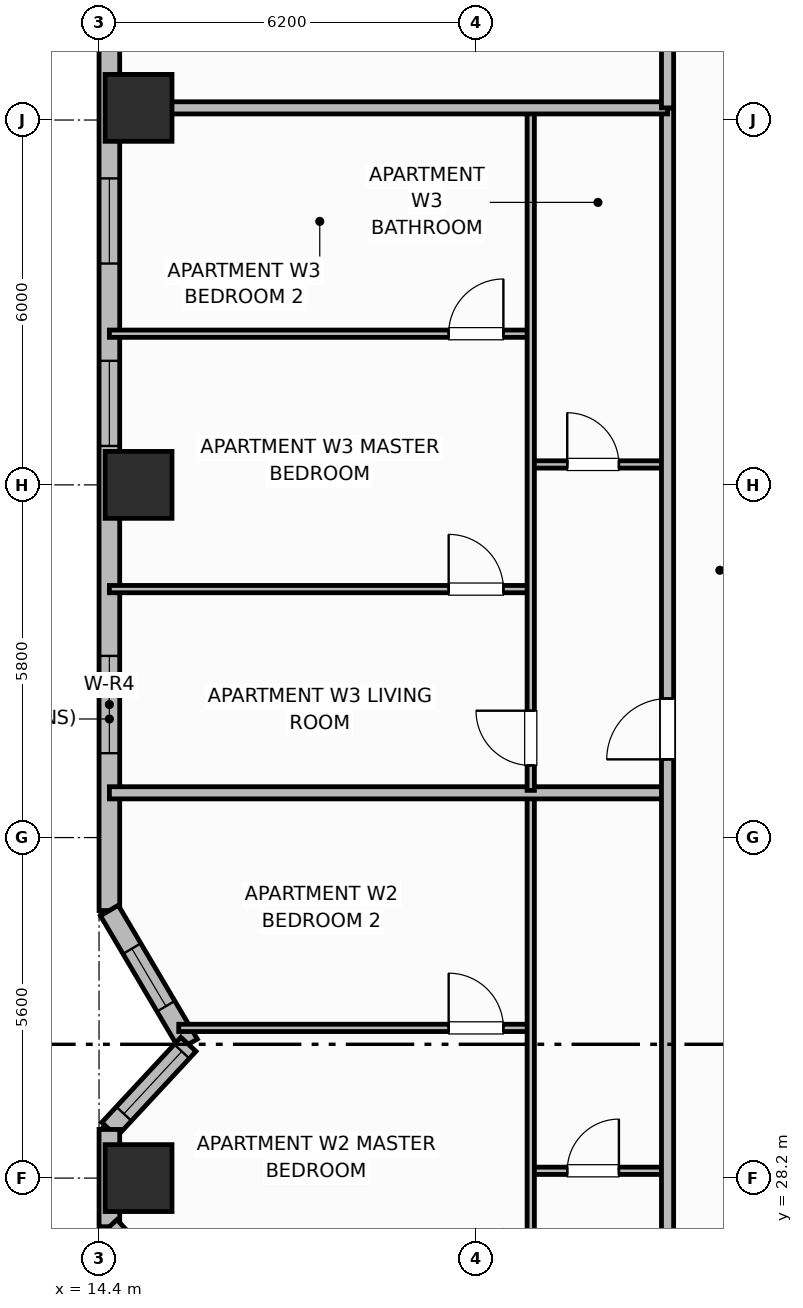
"""IFC4 building model, lengths in metres.
Left out: names, types, materials, properties, quantities, classifications, styles, units other than length and angle.
Written with IfcOpenShell. Run it as: python <this file> out.ifc"""

import sys

from ifc_helpers import new_model, si_unit, direction, frame, frame_2d, origin, origin_2d, place, context, subcontext, project, spatial, rectangle, extrude, element, fill, save


model = new_model("IFC4")
c1 = context("Model", 3, precision=1e-05, world=origin(), true_north=direction((0.0, 1.0)))
c2 = subcontext(c1, "Body", "Model", "MODEL_VIEW")
j1 = project(units=[si_unit("LENGTHUNIT", "METRE"), si_unit("PLANEANGLEUNIT", "RADIAN")], contexts=[c1])
p1 = place(None, origin())
s1 = spatial("IfcSite", under=j1, at=p1, CompositionType="ELEMENT")
p2 = place(p1, origin())
s2 = spatial("IfcBuilding", under=s1, at=p2, CompositionType="ELEMENT")
p3 = place(p2, frame((0.0, 0.0, 110.5)))
s3 = spatial("IfcBuildingStorey", under=s2, at=p3, CompositionType="ELEMENT", Elevation=110.5)
for number, where, z_axis, x_axis in (
    (1, (15.05, 28.2, 0.0), (0.0, 0.0, 1.0), (1.0, 0.0, 0.0)),
    (2, (15.05, 39.6, 0.0), (0.0, 0.0, 1.0), (1.0, 0.0, 0.0)),
    (3, (15.05, 45.8, 0.0), (0.0, 0.0, 1.0), (1.0, 0.0, 0.0)),
):
    element("IfcColumn", number, at=place(p3, frame(where, z_axis=z_axis, x_axis=x_axis)), inside=s3, PredefinedType="COLUMN", context=c2, shape_type="SweptSolid", body=[
        extrude(rectangle(XDim=1.1, YDim=1.1, at=origin_2d()), origin(), (0.0, 0.0, 1.0), 3.7),
    ])
p4 = place(p3, frame((14.57, 47.4, 0.0), z_axis=(0.0, 0.0, 1.0), x_axis=(0.0, -1.0, 0.0)))
e4 = element("IfcWall", 4, at=p4, inside=s3, PredefinedType="SOLIDWALL", context=c2, shape_type="SweptSolid", body=[
    extrude(rectangle(XDim=14.8, YDim=0.34, at=frame_2d((7.4, 0.0))), origin(), (0.0, 0.0, 1.0), 2.7),
])
p5 = place(p4, frame((2.76, 0.0, 0.69)))
e5 = element("IfcOpeningElement", 5, at=p5, cuts=e4, PredefinedType="OPENING", context=c2, shape_type="SweptSolid", body=[
    extrude(rectangle(XDim=1.4, YDim=1.85, at=frame_2d((0.7, 0.925))), frame((0.0, 0.18, 0.0), z_axis=(0.0, -1.0, 0.0), x_axis=(1.0, 0.0, 0.0)), (0.0, 0.0, 1.0), 0.36),
])
p6 = place(p4, frame((5.76, 0.0, 0.69)))
e6 = element("IfcOpeningElement", 6, at=p6, cuts=e4, PredefinedType="OPENING", context=c2, shape_type="SweptSolid", body=[
    extrude(rectangle(XDim=1.4, YDim=1.85, at=frame_2d((0.7, 0.925))), frame((0.0, 0.18, 0.0), z_axis=(0.0, -1.0, 0.0), x_axis=(1.0, 0.0, 0.0)), (0.0, 0.0, 1.0), 0.36),
])
p7 = place(p4, frame((10.613, 0.0, 0.68)))
e7 = element("IfcOpeningElement", 7, at=p7, cuts=e4, PredefinedType="OPENING", context=c2, shape_type="SweptSolid", body=[
    extrude(rectangle(XDim=1.6, YDim=1.9, at=frame_2d((0.8, 0.95))), frame((0.0, 0.18, 0.0), z_axis=(0.0, -1.0, 0.0), x_axis=(1.0, 0.0, 0.0)), (0.0, 0.0, 1.0), 0.36),
])
p8 = place(p3, frame((14.57, 32.6, 0.0), z_axis=(0.0, 0.0, 1.0), x_axis=(0.508710000703, -0.860937939218, 0.0)))
e8 = element("IfcWall", 8, at=p8, inside=s3, PredefinedType="SOLIDWALL", context=c2, shape_type="SweptSolid", body=[
    extrude(rectangle(XDim=2.556, YDim=0.34, at=frame_2d((1.278, 0.0))), origin(), (0.0, 0.0, 1.0), 2.7),
])
p9 = place(p8, frame((0.728, 0.0, 0.89)))
e9 = element("IfcOpeningElement", 9, at=p9, cuts=e8, PredefinedType="OPENING", context=c2, shape_type="SweptSolid", body=[
    extrude(rectangle(XDim=1.1, YDim=1.65, at=frame_2d((0.55, 0.825))), frame((0.0, 0.18, 0.0), z_axis=(0.0, -1.0, 0.0), x_axis=(1.0, 0.0, 0.0)), (0.0, 0.0, 1.0), 0.36),
])
p10 = place(p3, frame((15.87, 30.4, 0.0), z_axis=(0.0, 0.0, 1.0), x_axis=(-0.68049031116, -0.732757078722, 0.0)))
e10 = element("IfcWall", 10, at=p10, inside=s3, PredefinedType="SOLIDWALL", context=c2, shape_type="SweptSolid", body=[
    extrude(rectangle(XDim=1.91, YDim=0.34, at=frame_2d((0.955, 0.0))), origin(), (0.0, 0.0, 1.0), 2.7),
])
p11 = place(p10, frame((0.16, 0.0, 0.69)))
e11 = element("IfcOpeningElement", 11, at=p11, cuts=e10, PredefinedType="OPENING", context=c2, shape_type="SweptSolid", body=[
    extrude(rectangle(XDim=1.4, YDim=1.85, at=frame_2d((0.7, 0.925))), frame((0.0, 0.18, 0.0), z_axis=(0.0, -1.0, 0.0), x_axis=(1.0, 0.0, 0.0)), (0.0, 0.0, 1.0), 0.36),
])
p12 = place(p3, frame((14.57, 29.0, 0.0), z_axis=(0.0, 0.0, 1.0), x_axis=(0.0, -1.0, 0.0)))
e12 = element("IfcWall", 12, at=p12, inside=s3, PredefinedType="SOLIDWALL", context=c2, shape_type="SweptSolid", body=[
    extrude(rectangle(XDim=1.6, YDim=0.34, at=frame_2d((0.8, 0.0))), origin(), (0.0, 0.0, 1.0), 2.7),
])
p13 = place(p3, frame((14.57, 27.4, 0.0), z_axis=(0.0, 0.0, 1.0), x_axis=(0.68049031116, -0.732757078722, 0.0)))
e13 = element("IfcWall", 13, at=p13, inside=s3, PredefinedType="SOLIDWALL", context=c2, shape_type="SweptSolid", body=[
    extrude(rectangle(XDim=1.91, YDim=0.34, at=frame_2d((0.955, 0.0))), origin(), (0.0, 0.0, 1.0), 2.7),
])
p14 = place(p3, frame((21.5, 28.32, 0.0), z_axis=(0.0, 0.0, 1.0), x_axis=(1.0, 0.0, 0.0)))
e14 = element("IfcWall", 14, at=p14, inside=s3, PredefinedType="PARTITIONING", context=c2, shape_type="SweptSolid", body=[
    extrude(rectangle(XDim=2.25, YDim=0.12, at=frame_2d((1.125, 0.0))), origin(), (0.0, 0.0, 1.0), 2.53),
])
p15 = place(p14, frame((0.6, 0.0, 0.0)))
e15 = element("IfcOpeningElement", 15, at=p15, cuts=e14, PredefinedType="OPENING", context=c2, shape_type="SweptSolid", body=[
    extrude(rectangle(XDim=0.85, YDim=2.1, at=frame_2d((0.425, 1.05))), frame((0.0, 0.07, 0.0), z_axis=(0.0, -1.0, 0.0), x_axis=(1.0, 0.0, 0.0)), (0.0, 0.0, 1.0), 0.14),
])
p16 = place(p3, frame((15.71, 30.67, 0.0), z_axis=(0.0, 0.0, 1.0), x_axis=(1.0, 0.0, 0.0)))
e16 = element("IfcWall", 16, at=p16, inside=s3, PredefinedType="PARTITIONING", context=c2, shape_type="SweptSolid", body=[
    extrude(rectangle(XDim=5.79, YDim=0.12, at=frame_2d((2.895, 0.0))), origin(), (0.0, 0.0, 1.0), 2.53),
])
p17 = place(p16, frame((4.439, 0.0, 0.0)))
e17 = element("IfcOpeningElement", 17, at=p17, cuts=e16, PredefinedType="OPENING", context=c2, shape_type="SweptSolid", body=[
    extrude(rectangle(XDim=0.9, YDim=2.1, at=frame_2d((0.45, 1.05))), frame((0.0, 0.07, 0.0), z_axis=(0.0, -1.0, 0.0), x_axis=(1.0, 0.0, 0.0)), (0.0, 0.0, 1.0), 0.14),
])
p18 = place(p3, frame((21.5, 22.96, 0.0), z_axis=(0.0, 0.0, 1.0), x_axis=(0.0, 1.0, 0.0)))
e18 = element("IfcWall", 18, at=p18, inside=s3, PredefinedType="PARTITIONING", context=c2, shape_type="SweptSolid", body=[
    extrude(rectangle(XDim=11.536, YDim=0.12, at=frame_2d((5.768, 0.0))), origin(), (0.0, 0.0, 1.0), 2.53),
])
p19 = place(p18, frame((0.41, 0.0, 0.0)))
e19 = element("IfcOpeningElement", 19, at=p19, cuts=e18, PredefinedType="OPENING", context=c2, shape_type="SweptSolid", body=[
    extrude(rectangle(XDim=0.9, YDim=2.1, at=frame_2d((0.45, 1.05))), frame((0.0, 0.07, 0.0), z_axis=(0.0, -1.0, 0.0), x_axis=(1.0, 0.0, 0.0)), (0.0, 0.0, 1.0), 0.14),
])
p20 = place(p3, frame((14.57, 34.536, 0.0), z_axis=(0.0, 0.0, 1.0), x_axis=(1.0, 0.0, 0.0)))
e20 = element("IfcWall", 20, at=p20, inside=s3, PredefinedType="PARTITIONING", context=c2, shape_type="SweptSolid", body=[
    extrude(rectangle(XDim=9.18, YDim=0.2, at=frame_2d((4.59, 0.0))), origin(), (0.0, 0.0, 1.0), 2.53),
])
p21 = place(p3, frame((21.5, 39.936, 0.0), z_axis=(0.0, 0.0, 1.0), x_axis=(1.0, 0.0, 0.0)))
e21 = element("IfcWall", 21, at=p21, inside=s3, PredefinedType="PARTITIONING", context=c2, shape_type="SweptSolid", body=[
    extrude(rectangle(XDim=2.25, YDim=0.12, at=frame_2d((1.125, 0.0))), origin(), (0.0, 0.0, 1.0), 2.53),
])
p22 = place(p21, frame((0.6, 0.0, 0.0)))
e22 = element("IfcOpeningElement", 22, at=p22, cuts=e21, PredefinedType="OPENING", context=c2, shape_type="SweptSolid", body=[
    extrude(rectangle(XDim=0.85, YDim=2.1, at=frame_2d((0.425, 1.05))), frame((0.0, 0.07, 0.0), z_axis=(0.0, -1.0, 0.0), x_axis=(1.0, 0.0, 0.0)), (0.0, 0.0, 1.0), 0.14),
])
p23 = place(p3, frame((14.57, 37.886, 0.0), z_axis=(0.0, 0.0, 1.0), x_axis=(1.0, 0.0, 0.0)))
e23 = element("IfcWall", 23, at=p23, inside=s3, PredefinedType="PARTITIONING", context=c2, shape_type="SweptSolid", body=[
    extrude(rectangle(XDim=6.93, YDim=0.12, at=frame_2d((3.465, 0.0))), origin(), (0.0, 0.0, 1.0), 2.53),
])
p24 = place(p23, frame((5.58, 0.0, 0.0)))
e24 = element("IfcOpeningElement", 24, at=p24, cuts=e23, PredefinedType="OPENING", context=c2, shape_type="SweptSolid", body=[
    extrude(rectangle(XDim=0.9, YDim=2.1, at=frame_2d((0.45, 1.05))), frame((0.0, 0.07, 0.0), z_axis=(0.0, -1.0, 0.0), x_axis=(1.0, 0.0, 0.0)), (0.0, 0.0, 1.0), 0.14),
])
p25 = place(p3, frame((14.57, 42.086, 0.0), z_axis=(0.0, 0.0, 1.0), x_axis=(1.0, 0.0, 0.0)))
e25 = element("IfcWall", 25, at=p25, inside=s3, PredefinedType="PARTITIONING", context=c2, shape_type="SweptSolid", body=[
    extrude(rectangle(XDim=6.93, YDim=0.12, at=frame_2d((3.465, 0.0))), origin(), (0.0, 0.0, 1.0), 2.53),
])
p26 = place(p25, frame((5.58, 0.0, 0.0)))
e26 = element("IfcOpeningElement", 26, at=p26, cuts=e25, PredefinedType="OPENING", context=c2, shape_type="SweptSolid", body=[
    extrude(rectangle(XDim=0.9, YDim=2.1, at=frame_2d((0.45, 1.05))), frame((0.0, 0.07, 0.0), z_axis=(0.0, -1.0, 0.0), x_axis=(1.0, 0.0, 0.0)), (0.0, 0.0, 1.0), 0.14),
])
p27 = place(p3, frame((21.5, 34.576, 0.0), z_axis=(0.0, 0.0, 1.0), x_axis=(0.0, 1.0, 0.0)))
e27 = element("IfcWall", 27, at=p27, inside=s3, PredefinedType="PARTITIONING", context=c2, shape_type="SweptSolid", body=[
    extrude(rectangle(XDim=11.184, YDim=0.12, at=frame_2d((5.592, 0.0))), origin(), (0.0, 0.0, 1.0), 2.53),
])
p28 = place(p27, frame((0.41, 0.0, 0.0)))
e28 = element("IfcOpeningElement", 28, at=p28, cuts=e27, PredefinedType="OPENING", context=c2, shape_type="SweptSolid", body=[
    extrude(rectangle(XDim=0.9, YDim=2.1, at=frame_2d((0.45, 1.05))), frame((0.0, 0.07, 0.0), z_axis=(0.0, -1.0, 0.0), x_axis=(1.0, 0.0, 0.0)), (0.0, 0.0, 1.0), 0.14),
])
p29 = place(p3, frame((23.75, 10.6, 0.0), z_axis=(0.0, 0.0, 1.0), x_axis=(0.0, 1.0, 0.0)))
e29 = element("IfcWall", 29, at=p29, inside=s3, PredefinedType="PARTITIONING", context=c2, shape_type="SweptSolid", body=[
    extrude(rectangle(XDim=35.2, YDim=0.2, at=frame_2d((17.6, 0.0))), origin(), (0.0, 0.0, 1.0), 2.53),
])
p30 = place(p29, frame((2.65, 0.0, 0.0)))
e30 = element("IfcOpeningElement", 30, at=p30, cuts=e29, PredefinedType="OPENING", context=c2, shape_type="SweptSolid", body=[
    extrude(rectangle(XDim=1.0, YDim=2.15, at=frame_2d((0.5, 1.075))), frame((0.0, 0.11, 0.0), z_axis=(0.0, -1.0, 0.0), x_axis=(1.0, 0.0, 0.0)), (0.0, 0.0, 1.0), 0.22),
])
p31 = place(p29, frame((12.87, 0.0, 0.0)))
e31 = element("IfcOpeningElement", 31, at=p31, cuts=e29, PredefinedType="OPENING", context=c2, shape_type="SweptSolid", body=[
    extrude(rectangle(XDim=1.0, YDim=2.15, at=frame_2d((0.5, 1.075))), frame((0.0, 0.11, 0.0), z_axis=(0.0, -1.0, 0.0), x_axis=(1.0, 0.0, 0.0)), (0.0, 0.0, 1.0), 0.22),
])
p32 = place(p29, frame((24.486, 0.0, 0.0)))
e32 = element("IfcOpeningElement", 32, at=p32, cuts=e29, PredefinedType="OPENING", context=c2, shape_type="SweptSolid", body=[
    extrude(rectangle(XDim=1.0, YDim=2.15, at=frame_2d((0.5, 1.075))), frame((0.0, 0.11, 0.0), z_axis=(0.0, -1.0, 0.0), x_axis=(1.0, 0.0, 0.0)), (0.0, 0.0, 1.0), 0.22),
])
p33 = place(p3, frame((14.99, 45.8, 0.0), z_axis=(0.0, 0.0, 1.0), x_axis=(1.0, 0.0, 0.0)))
e33 = element("IfcWall", 33, at=p33, inside=s3, PredefinedType="PARTITIONING", context=c2, shape_type="SweptSolid", body=[
    extrude(rectangle(XDim=8.76, YDim=0.2, at=frame_2d((4.38, 0.0))), origin(), (0.0, 0.0, 1.0), 2.53),
])
p34 = place(p3, frame((23.75, 45.8, 0.0), z_axis=(0.0, 0.0, 1.0), x_axis=(0.0, 1.0, 0.0)))
e34 = element("IfcWall", 34, at=p34, inside=s3, PredefinedType="PARTITIONING", context=c2, shape_type="SweptSolid", body=[
    extrude(rectangle(XDim=5.63, YDim=0.2, at=frame_2d((2.815, 0.0))), origin(), (0.0, 0.0, 1.0), 2.53),
])
p35 = place(p5, origin())
e35 = element("IfcWindow", 35, at=p35, inside=s3, PartitioningType="SINGLE_PANEL", PredefinedType="WINDOW", context=c2, shape_type="SweptSolid", body=[
    extrude(rectangle(XDim=1.4, YDim=1.85, at=frame_2d((0.7, 0.925))), frame((0.0, 0.03, 0.0), z_axis=(0.0, -1.0, 0.0), x_axis=(1.0, 0.0, 0.0)), (0.0, 0.0, 1.0), 0.06),
])
fill(e5, e35)
p36 = place(p6, origin())
e36 = element("IfcWindow", 36, at=p36, inside=s3, PartitioningType="SINGLE_PANEL", PredefinedType="WINDOW", context=c2, shape_type="SweptSolid", body=[
    extrude(rectangle(XDim=1.4, YDim=1.85, at=frame_2d((0.7, 0.925))), frame((0.0, 0.03, 0.0), z_axis=(0.0, -1.0, 0.0), x_axis=(1.0, 0.0, 0.0)), (0.0, 0.0, 1.0), 0.06),
])
fill(e6, e36)
p37 = place(p7, origin())
e37 = element("IfcWindow", 37, at=p37, inside=s3, PartitioningType="SINGLE_PANEL", PredefinedType="WINDOW", context=c2, shape_type="SweptSolid", body=[
    extrude(rectangle(XDim=1.6, YDim=1.9, at=frame_2d((0.8, 0.95))), frame((0.0, 0.03, 0.0), z_axis=(0.0, -1.0, 0.0), x_axis=(1.0, 0.0, 0.0)), (0.0, 0.0, 1.0), 0.06),
])
fill(e7, e37)
p38 = place(p9, origin())
e38 = element("IfcWindow", 38, at=p38, inside=s3, PartitioningType="SINGLE_PANEL", PredefinedType="WINDOW", context=c2, shape_type="SweptSolid", body=[
    extrude(rectangle(XDim=1.1, YDim=1.65, at=frame_2d((0.55, 0.825))), frame((0.0, 0.03, 0.0), z_axis=(0.0, -1.0, 0.0), x_axis=(1.0, 0.0, 0.0)), (0.0, 0.0, 1.0), 0.06),
])
fill(e9, e38)
p39 = place(p11, origin())
e39 = element("IfcWindow", 39, at=p39, inside=s3, PartitioningType="SINGLE_PANEL", PredefinedType="WINDOW", context=c2, shape_type="SweptSolid", body=[
    extrude(rectangle(XDim=1.4, YDim=1.85, at=frame_2d((0.7, 0.925))), frame((0.0, 0.03, 0.0), z_axis=(0.0, -1.0, 0.0), x_axis=(1.0, 0.0, 0.0)), (0.0, 0.0, 1.0), 0.06),
])
fill(e11, e39)
p40 = place(p15, origin())
e40 = element("IfcDoor", 40, at=p40, inside=s3, OperationType="SINGLE_SWING_RIGHT", PredefinedType="DOOR", context=c2, shape_type="SweptSolid", body=[
    extrude(rectangle(XDim=0.85, YDim=2.1, at=frame_2d((0.425, 1.05))), frame((0.0, 0.025, 0.0), z_axis=(0.0, -1.0, 0.0), x_axis=(1.0, 0.0, 0.0)), (0.0, 0.0, 1.0), 0.05),
])
fill(e15, e40)
p41 = place(p17, origin())
e41 = element("IfcDoor", 41, at=p41, inside=s3, OperationType="SINGLE_SWING_LEFT", PredefinedType="DOOR", context=c2, shape_type="SweptSolid", body=[
    extrude(rectangle(XDim=0.9, YDim=2.1, at=frame_2d((0.45, 1.05))), frame((0.0, 0.025, 0.0), z_axis=(0.0, -1.0, 0.0), x_axis=(1.0, 0.0, 0.0)), (0.0, 0.0, 1.0), 0.05),
])
fill(e17, e41)
p42 = place(p22, origin())
e42 = element("IfcDoor", 42, at=p42, inside=s3, OperationType="SINGLE_SWING_LEFT", PredefinedType="DOOR", context=c2, shape_type="SweptSolid", body=[
    extrude(rectangle(XDim=0.85, YDim=2.1, at=frame_2d((0.425, 1.05))), frame((0.0, 0.025, 0.0), z_axis=(0.0, -1.0, 0.0), x_axis=(1.0, 0.0, 0.0)), (0.0, 0.0, 1.0), 0.05),
])
fill(e22, e42)
p43 = place(p24, origin())
e43 = element("IfcDoor", 43, at=p43, inside=s3, OperationType="SINGLE_SWING_LEFT", PredefinedType="DOOR", context=c2, shape_type="SweptSolid", body=[
    extrude(rectangle(XDim=0.9, YDim=2.1, at=frame_2d((0.45, 1.05))), frame((0.0, 0.025, 0.0), z_axis=(0.0, -1.0, 0.0), x_axis=(1.0, 0.0, 0.0)), (0.0, 0.0, 1.0), 0.05),
])
fill(e24, e43)
p44 = place(p26, origin())
e44 = element("IfcDoor", 44, at=p44, inside=s3, OperationType="SINGLE_SWING_RIGHT", PredefinedType="DOOR", context=c2, shape_type="SweptSolid", body=[
    extrude(rectangle(XDim=0.9, YDim=2.1, at=frame_2d((0.45, 1.05))), frame((0.0, 0.025, 0.0), z_axis=(0.0, -1.0, 0.0), x_axis=(1.0, 0.0, 0.0)), (0.0, 0.0, 1.0), 0.05),
])
fill(e26, e44)
p45 = place(p28, origin())
e45 = element("IfcDoor", 45, at=p45, inside=s3, OperationType="SINGLE_SWING_RIGHT", PredefinedType="DOOR", context=c2, shape_type="SweptSolid", body=[
    extrude(rectangle(XDim=0.9, YDim=2.1, at=frame_2d((0.45, 1.05))), frame((0.0, 0.025, 0.0), z_axis=(0.0, -1.0, 0.0), x_axis=(1.0, 0.0, 0.0)), (0.0, 0.0, 1.0), 0.05),
])
fill(e28, e45)
p46 = place(p32, origin())
e46 = element("IfcDoor", 46, at=p46, inside=s3, OperationType="SINGLE_SWING_LEFT", PredefinedType="DOOR", context=c2, shape_type="SweptSolid", body=[
    extrude(rectangle(XDim=1.0, YDim=2.15, at=frame_2d((0.5, 1.075))), frame((0.0, 0.025, 0.0), z_axis=(0.0, -1.0, 0.0), x_axis=(1.0, 0.0, 0.0)), (0.0, 0.0, 1.0), 0.05),
])
fill(e32, e46)
save(model, sys.argv[1])
